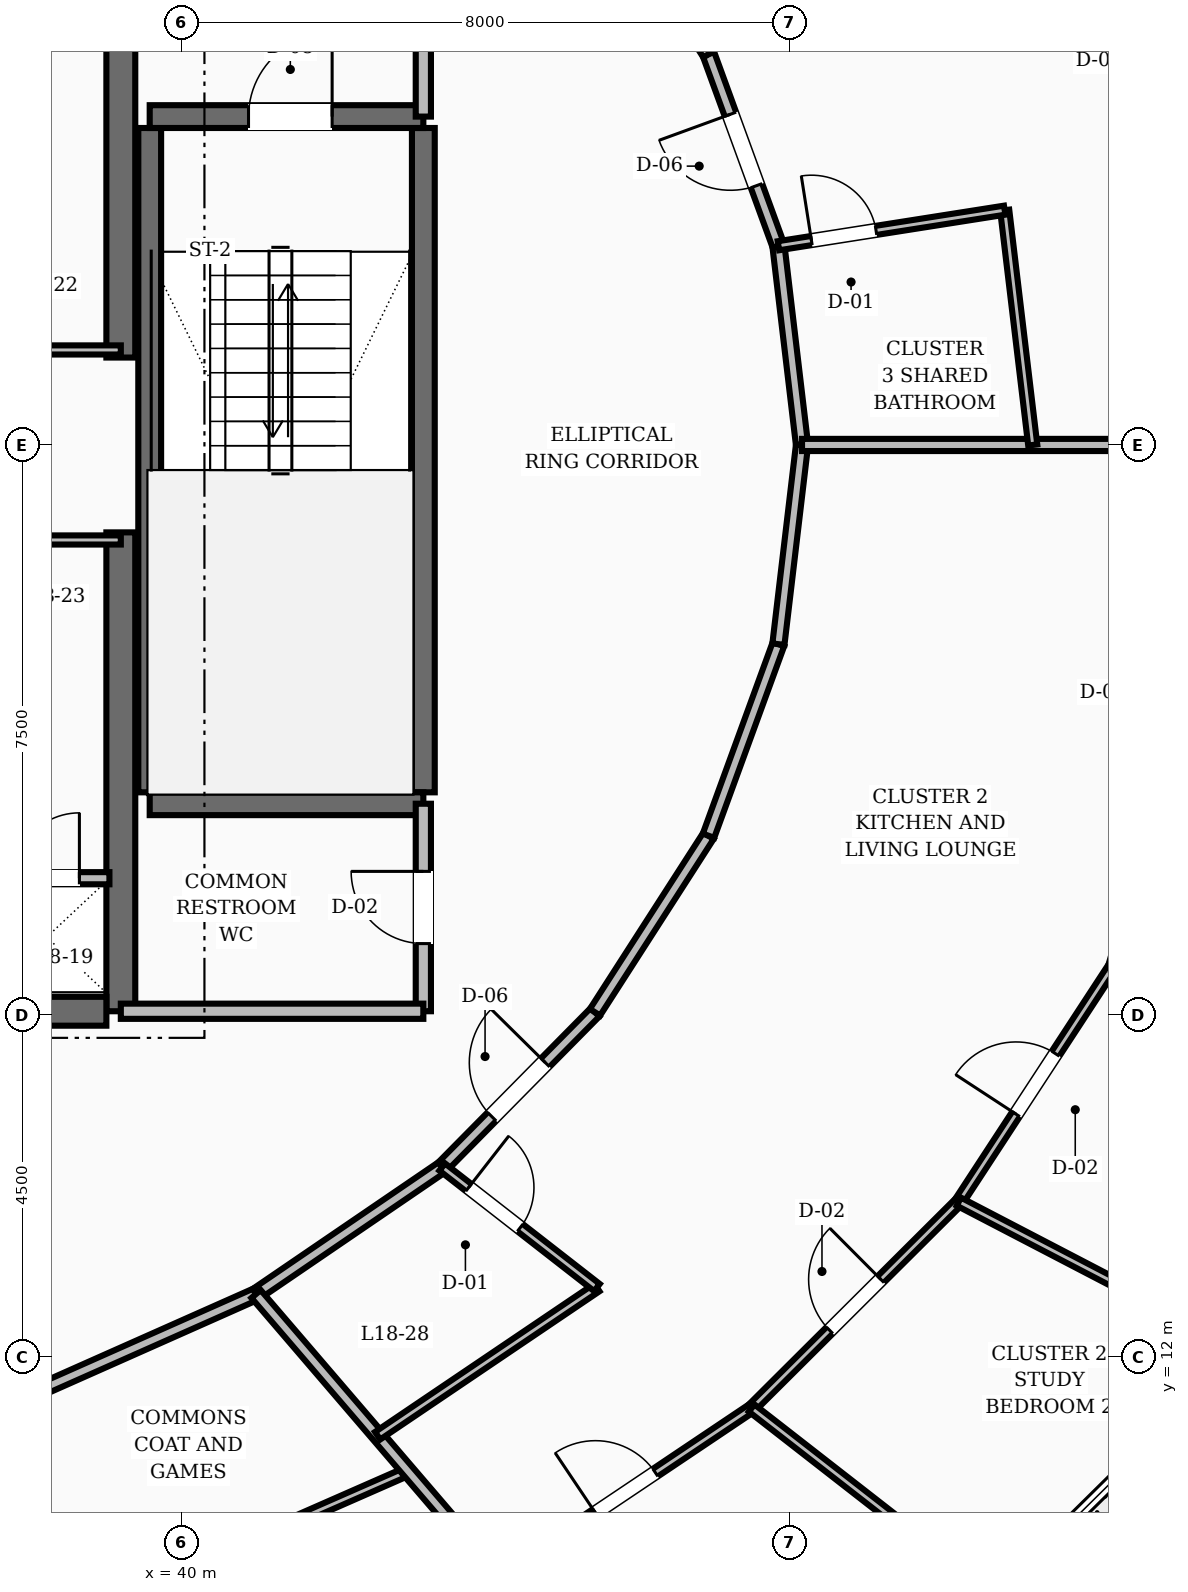
"""IFC4 building model, lengths in metres.
Left out: names, types, materials, properties, quantities, classifications, styles, units other than length and angle.
Written with IfcOpenShell. Run it as: python <this file> out.ifc"""

import sys

from ifc_helpers import new_model, si_unit, direction, frame, frame_2d, origin, place, context, subcontext, project, spatial, rectangle, extrude, element, fill, save


model = new_model("IFC4")
c1 = context("Model", 3, precision=1e-05, world=origin(), true_north=direction((0.0, 1.0)))
c2 = subcontext(c1, "Body", "Model", "MODEL_VIEW")
j1 = project(units=[si_unit("LENGTHUNIT", "METRE"), si_unit("PLANEANGLEUNIT", "RADIAN")], contexts=[c1])
p1 = place(None, origin())
s1 = spatial("IfcSite", under=j1, at=p1, CompositionType="ELEMENT")
p2 = place(p1, origin())
s2 = spatial("IfcBuilding", under=s1, at=p2, CompositionType="ELEMENT")
p3 = place(p2, frame((0.0, 0.0, 73.6)))
s3 = spatial("IfcBuildingStorey", under=s2, at=p3, CompositionType="ELEMENT", Elevation=73.6)
for number, where, z_axis, x_axis in (
    (1, (39.2, 16.55, 0.0), (0.0, 0.0, 1.0), (0.0, 1.0, 0.0)),
    (2, (39.2, 25.15, 0.0), (0.0, 0.0, 1.0), (0.0, 1.0, 0.0)),
):
    element("IfcWall", number, at=place(p3, frame(where, z_axis=z_axis, x_axis=x_axis)), inside=s3, PredefinedType="SHEAR", context=c2, shape_type="SweptSolid", body=[
        extrude(rectangle(XDim=6.3, YDim=0.38, at=frame_2d((3.15, 0.0))), origin(), (0.0, 0.0, 1.0), 3.6),
    ])
p4 = place(p3, frame((35.8, 16.55, 0.0), z_axis=(0.0, 0.0, 1.0), x_axis=(1.0, 0.0, 0.0)))
e3 = element("IfcWall", 3, at=p4, inside=s3, PredefinedType="SHEAR", context=c2, shape_type="SweptSolid", body=[
    extrude(rectangle(XDim=3.21, YDim=0.38, at=frame_2d((1.605, 0.0))), origin(), (0.0, 0.0, 1.0), 3.6),
])
p5 = place(p4, frame((0.3, 0.0, 0.0)))
e4 = element("IfcOpeningElement", 4, at=p5, cuts=e3, PredefinedType="OPENING", context=c2, shape_type="SweptSolid", body=[
    extrude(rectangle(XDim=1.1, YDim=2.1, at=frame_2d((0.55, 1.05))), frame((0.0, 0.2, 0.0), z_axis=(0.0, -1.0, 0.0), x_axis=(1.0, 0.0, 0.0)), (0.0, 0.0, 1.0), 0.4),
])
for number, where, z_axis, x_axis in (
    (5, (43.18, 19.43, 0.0), (0.0, 0.0, 1.0), (0.0, 1.0, 0.0)),
    (6, (39.58, 19.43, 0.0), (0.0, 0.0, 1.0), (0.0, 1.0, 0.0)),
):
    element("IfcWall", number, at=place(p3, frame(where, z_axis=z_axis, x_axis=x_axis)), inside=s3, PredefinedType="SHEAR", context=c2, shape_type="SweptSolid", body=[
        extrude(rectangle(XDim=8.74, YDim=0.3, at=frame_2d((4.37, 0.0))), origin(), (0.0, 0.0, 1.0), 3.6),
    ])
p6 = place(p3, frame((39.58, 19.28, 0.0), z_axis=(0.0, 0.0, 1.0), x_axis=(1.0, 0.0, 0.0)))
e7 = element("IfcWall", 7, at=p6, inside=s3, PredefinedType="SHEAR", context=c2, shape_type="SweptSolid", body=[
    extrude(rectangle(XDim=3.6, YDim=0.3, at=frame_2d((1.8, 0.0))), origin(), (0.0, 0.0, 1.0), 3.6),
])
p7 = place(p3, frame((39.58, 28.32, 0.0), z_axis=(0.0, 0.0, 1.0), x_axis=(1.0, 0.0, 0.0)))
e8 = element("IfcWall", 8, at=p7, inside=s3, PredefinedType="SHEAR", context=c2, shape_type="SweptSolid", body=[
    extrude(rectangle(XDim=3.6, YDim=0.3, at=frame_2d((1.8, 0.0))), origin(), (0.0, 0.0, 1.0), 3.6),
])
p8 = place(p7, frame((1.3, 0.0, 0.0)))
e9 = element("IfcOpeningElement", 9, at=p8, cuts=e8, PredefinedType="OPENING", context=c2, shape_type="SweptSolid", body=[
    extrude(rectangle(XDim=1.1, YDim=2.1, at=frame_2d((0.55, 1.05))), frame((0.0, 0.16, 0.0), z_axis=(0.0, -1.0, 0.0), x_axis=(1.0, 0.0, 0.0)), (0.0, 0.0, 1.0), 0.32),
])
p9 = place(p3, frame((43.18, 28.32, 0.0), z_axis=(0.0, 0.0, 1.0), x_axis=(0.0, 1.0, 0.0)))
e10 = element("IfcWall", 10, at=p9, inside=s3, PredefinedType="SOLIDWALL", context=c2, shape_type="SweptSolid", body=[
    extrude(rectangle(XDim=3.13, YDim=0.2, at=frame_2d((1.565, 0.0))), origin(), (0.0, 0.0, 1.0), 2.71),
])
p10 = place(p9, frame((1.015, 0.0, 0.0)))
e11 = element("IfcOpeningElement", 11, at=p10, cuts=e10, PredefinedType="OPENING", context=c2, shape_type="SweptSolid", body=[
    extrude(rectangle(XDim=1.1, YDim=2.1, at=frame_2d((0.55, 1.05))), frame((0.0, 0.11, 0.0), z_axis=(0.0, -1.0, 0.0), x_axis=(1.0, 0.0, 0.0)), (0.0, 0.0, 1.0), 0.22),
])
p11 = place(p3, frame((43.18, 16.55, 0.0), z_axis=(0.0, 0.0, 1.0), x_axis=(0.0, 1.0, 0.0)))
e12 = element("IfcWall", 12, at=p11, inside=s3, PredefinedType="SOLIDWALL", context=c2, shape_type="SweptSolid", body=[
    extrude(rectangle(XDim=2.73, YDim=0.2, at=frame_2d((1.365, 0.0))), origin(), (0.0, 0.0, 1.0), 2.71),
])
p12 = place(p11, frame((0.89, 0.0, 0.0)))
e13 = element("IfcOpeningElement", 13, at=p12, cuts=e12, PredefinedType="OPENING", context=c2, shape_type="SweptSolid", body=[
    extrude(rectangle(XDim=0.95, YDim=2.1, at=frame_2d((0.475, 1.05))), frame((0.0, 0.11, 0.0), z_axis=(0.0, -1.0, 0.0), x_axis=(1.0, 0.0, 0.0)), (0.0, 0.0, 1.0), 0.22),
])
p13 = place(p3, frame((39.2, 16.55, 0.0), z_axis=(0.0, 0.0, 1.0), x_axis=(1.0, 0.0, 0.0)))
e14 = element("IfcWall", 14, at=p13, inside=s3, PredefinedType="SOLIDWALL", context=c2, shape_type="SweptSolid", body=[
    extrude(rectangle(XDim=3.98, YDim=0.2, at=frame_2d((1.99, 0.0))), origin(), (0.0, 0.0, 1.0), 2.71),
])
p14 = place(p3, frame((37.4, 18.3, 0.0), z_axis=(0.0, 0.0, 1.0), x_axis=(1.0, 0.0, 0.0)))
e15 = element("IfcWall", 15, at=p14, inside=s3, PredefinedType="SOLIDWALL", context=c2, shape_type="SweptSolid", body=[
    extrude(rectangle(XDim=1.65, YDim=0.16, at=frame_2d((0.825, 0.0))), origin(), (0.0, 0.0, 1.0), 2.71),
])
p15 = place(p14, frame((0.395, 0.0, 0.0)))
e16 = element("IfcOpeningElement", 16, at=p15, cuts=e15, PredefinedType="OPENING", context=c2, shape_type="SweptSolid", body=[
    extrude(rectangle(XDim=0.86, YDim=2.1, at=frame_2d((0.43, 1.05))), frame((0.0, 0.09, 0.0), z_axis=(0.0, -1.0, 0.0), x_axis=(1.0, 0.0, 0.0)), (0.0, 0.0, 1.0), 0.18),
])
for number, where, z_axis, x_axis in (
    (17, (37.4, 25.25, 0.0), (0.0, 0.0, 1.0), (1.0, 0.0, 0.0)),
    (18, (37.4, 22.75, 0.0), (0.0, 0.0, 1.0), (1.0, 0.0, 0.0)),
):
    element("IfcWall", number, at=place(p3, frame(where, z_axis=z_axis, x_axis=x_axis)), inside=s3, PredefinedType="PARTITIONING", context=c2, shape_type="SweptSolid", body=[
        extrude(rectangle(XDim=1.8, YDim=0.12, at=frame_2d((0.9, 0.0))), origin(), (0.0, 0.0, 1.0), 2.71),
    ])
p16 = place(p3, frame((48.162, 24.0, 0.0), z_axis=(0.0, 0.0, 1.0), x_axis=(-0.117667763342, 0.993053018459, 0.0)))
e19 = element("IfcWall", 19, at=p16, inside=s3, PredefinedType="SOLIDWALL", context=c2, shape_type="SweptSolid", body=[
    extrude(rectangle(XDim=2.639, YDim=0.16, at=frame_2d((1.32, 0.0))), origin(), (0.0, 0.0, 1.0), 2.71),
])
p17 = place(p3, frame((47.852, 26.621, 0.0), z_axis=(0.0, 0.0, 1.0), x_axis=(-0.342882618672, 0.939378257047, 0.0)))
e20 = element("IfcWall", 20, at=p17, inside=s3, PredefinedType="SOLIDWALL", context=c2, shape_type="SweptSolid", body=[
    extrude(rectangle(XDim=2.683, YDim=0.16, at=frame_2d((1.341, 0.0))), origin(), (0.0, 0.0, 1.0), 2.71),
])
p18 = place(p17, frame((0.841, 0.0, 0.0)))
e21 = element("IfcOpeningElement", 21, at=p18, cuts=e20, PredefinedType="OPENING", context=c2, shape_type="SweptSolid", body=[
    extrude(rectangle(XDim=1.0, YDim=2.1, at=frame_2d((0.5, 1.05))), frame((0.0, 0.09, 0.0), z_axis=(0.0, -1.0, 0.0), x_axis=(1.0, 0.0, 0.0)), (0.0, 0.0, 1.0), 0.18),
])
p19 = place(p3, frame((46.932, 29.141, 0.0), z_axis=(0.0, 0.0, 1.0), x_axis=(-0.540891657444, 0.841092274907, 0.0)))
e22 = element("IfcWall", 22, at=p19, inside=s3, PredefinedType="SOLIDWALL", context=c2, shape_type="SweptSolid", body=[
    extrude(rectangle(XDim=2.761, YDim=0.16, at=frame_2d((1.38, 0.0))), origin(), (0.0, 0.0, 1.0), 2.71),
])
p20 = place(p3, frame((38.185, 11.589, 0.0), z_axis=(0.0, 0.0, 1.0), x_axis=(0.913860932409, 0.406027334321, 0.0)))
e23 = element("IfcWall", 23, at=p20, inside=s3, PredefinedType="SOLIDWALL", context=c2, shape_type="SweptSolid", body=[
    extrude(rectangle(XDim=3.058, YDim=0.16, at=frame_2d((1.529, 0.0))), origin(), (0.0, 0.0, 1.0), 2.71),
])
p21 = place(p3, frame((40.979, 12.83, 0.0), z_axis=(0.0, 0.0, 1.0), x_axis=(0.826112340767, 0.563505457323, 0.0)))
e24 = element("IfcWall", 24, at=p21, inside=s3, PredefinedType="SOLIDWALL", context=c2, shape_type="SweptSolid", body=[
    extrude(rectangle(XDim=2.965, YDim=0.16, at=frame_2d((1.482, 0.0))), origin(), (0.0, 0.0, 1.0), 2.71),
])
p22 = place(p3, frame((43.428, 14.501, 0.0), z_axis=(0.0, 0.0, 1.0), x_axis=(0.702569520063, 0.711615113301, 0.0)))
e25 = element("IfcWall", 25, at=p22, inside=s3, PredefinedType="SOLIDWALL", context=c2, shape_type="SweptSolid", body=[
    extrude(rectangle(XDim=2.861, YDim=0.16, at=frame_2d((1.43, 0.0))), origin(), (0.0, 0.0, 1.0), 2.71),
])
p23 = place(p22, frame((0.93, 0.0, 0.0)))
e26 = element("IfcOpeningElement", 26, at=p23, cuts=e25, PredefinedType="OPENING", context=c2, shape_type="SweptSolid", body=[
    extrude(rectangle(XDim=1.0, YDim=2.1, at=frame_2d((0.5, 1.05))), frame((0.0, 0.09, 0.0), z_axis=(0.0, -1.0, 0.0), x_axis=(1.0, 0.0, 0.0)), (0.0, 0.0, 1.0), 0.18),
])
p24 = place(p3, frame((45.438, 16.537, 0.0), z_axis=(0.0, 0.0, 1.0), x_axis=(0.540891657444, 0.841092274907, 0.0)))
e27 = element("IfcWall", 27, at=p24, inside=s3, PredefinedType="SOLIDWALL", context=c2, shape_type="SweptSolid", body=[
    extrude(rectangle(XDim=2.761, YDim=0.16, at=frame_2d((1.38, 0.0))), origin(), (0.0, 0.0, 1.0), 2.71),
])
p25 = place(p3, frame((46.932, 18.859, 0.0), z_axis=(0.0, 0.0, 1.0), x_axis=(0.342882618672, 0.939378257047, 0.0)))
e28 = element("IfcWall", 28, at=p25, inside=s3, PredefinedType="SOLIDWALL", context=c2, shape_type="SweptSolid", body=[
    extrude(rectangle(XDim=2.683, YDim=0.16, at=frame_2d((1.341, 0.0))), origin(), (0.0, 0.0, 1.0), 2.71),
])
p26 = place(p3, frame((47.852, 21.379, 0.0), z_axis=(0.0, 0.0, 1.0), x_axis=(0.117667763342, 0.993053018459, 0.0)))
e29 = element("IfcWall", 29, at=p26, inside=s3, PredefinedType="SOLIDWALL", context=c2, shape_type="SweptSolid", body=[
    extrude(rectangle(XDim=2.639, YDim=0.16, at=frame_2d((1.32, 0.0))), origin(), (0.0, 0.0, 1.0), 2.71),
])
p27 = place(p3, frame((39.562, 8.999, 0.0), z_axis=(0.0, 0.0, 1.0), x_axis=(0.915567645544, 0.402164004397, 0.0)))
e30 = element("IfcWall", 30, at=p27, inside=s3, PredefinedType="PARTITIONING", context=c2, shape_type="SweptSolid", body=[
    extrude(rectangle(XDim=3.731, YDim=0.12, at=frame_2d((1.865, 0.0))), origin(), (0.0, 0.0, 1.0), 2.71),
])
p28 = place(p3, frame((40.979, 12.83, 0.0), z_axis=(0.0, 0.0, 1.0), x_axis=(0.651051797371, -0.759033304368, 0.0)))
e31 = element("IfcWall", 31, at=p28, inside=s3, PredefinedType="SOLIDWALL", context=c2, shape_type="SweptSolid", body=[
    extrude(rectangle(XDim=8.723, YDim=0.16, at=frame_2d((4.361, 0.0))), origin(), (0.0, 0.0, 1.0), 2.71),
])
p29 = place(p3, frame((42.578, 10.966, 0.0), z_axis=(0.0, 0.0, 1.0), x_axis=(0.828593363903, 0.55985090631, 0.0)))
e32 = element("IfcWall", 32, at=p29, inside=s3, PredefinedType="PARTITIONING", context=c2, shape_type="SweptSolid", body=[
    extrude(rectangle(XDim=3.482, YDim=0.12, at=frame_2d((1.741, 0.0))), origin(), (0.0, 0.0, 1.0), 2.71),
])
p30 = place(p3, frame((43.428, 14.501, 0.0), z_axis=(0.0, 0.0, 1.0), x_axis=(0.788862844391, -0.61456929043, 0.0)))
e33 = element("IfcWall", 33, at=p30, inside=s3, PredefinedType="PARTITIONING", context=c2, shape_type="SweptSolid", body=[
    extrude(rectangle(XDim=2.58, YDim=0.12, at=frame_2d((1.29, 0.0))), origin(), (0.0, 0.0, 1.0), 2.71),
])
p31 = place(p30, frame((0.44, 0.0, 0.0)))
e34 = element("IfcOpeningElement", 34, at=p31, cuts=e33, PredefinedType="OPENING", context=c2, shape_type="SweptSolid", body=[
    extrude(rectangle(XDim=0.86, YDim=2.1, at=frame_2d((0.43, 1.05))), frame((0.0, 0.07, 0.0), z_axis=(0.0, -1.0, 0.0), x_axis=(1.0, 0.0, 0.0)), (0.0, 0.0, 1.0), 0.14),
])
p32 = place(p3, frame((44.177, 9.101, 0.0), z_axis=(0.0, 0.0, 1.0), x_axis=(0.830412762524, 0.557148673011, 0.0)))
e35 = element("IfcWall", 35, at=p32, inside=s3, PredefinedType="PARTITIONING", context=c2, shape_type="SweptSolid", body=[
    extrude(rectangle(XDim=4.0, YDim=0.12, at=frame_2d((2.0, 0.0))), origin(), (0.0, 0.0, 1.0), 2.71),
])
p33 = place(p32, frame((1.525, 0.0, 0.0)))
e36 = element("IfcOpeningElement", 36, at=p33, cuts=e35, PredefinedType="OPENING", context=c2, shape_type="SweptSolid", body=[
    extrude(rectangle(XDim=0.95, YDim=2.1, at=frame_2d((0.475, 1.05))), frame((0.0, 0.07, 0.0), z_axis=(0.0, -1.0, 0.0), x_axis=(1.0, 0.0, 0.0)), (0.0, 0.0, 1.0), 0.14),
])
p34 = place(p3, frame((47.499, 11.33, 0.0), z_axis=(0.0, 0.0, 1.0), x_axis=(0.708501340015, 0.705709466563, 0.0)))
e37 = element("IfcWall", 37, at=p34, inside=s3, PredefinedType="PARTITIONING", context=c2, shape_type="SweptSolid", body=[
    extrude(rectangle(XDim=3.848, YDim=0.12, at=frame_2d((1.924, 0.0))), origin(), (0.0, 0.0, 1.0), 2.71),
])
p35 = place(p34, frame((1.449, 0.0, 0.0)))
e38 = element("IfcOpeningElement", 38, at=p35, cuts=e37, PredefinedType="OPENING", context=c2, shape_type="SweptSolid", body=[
    extrude(rectangle(XDim=0.95, YDim=2.1, at=frame_2d((0.475, 1.05))), frame((0.0, 0.07, 0.0), z_axis=(0.0, -1.0, 0.0), x_axis=(1.0, 0.0, 0.0)), (0.0, 0.0, 1.0), 0.14),
])
p36 = place(p3, frame((47.499, 11.33, 0.0), z_axis=(0.0, 0.0, 1.0), x_axis=(0.788892410808, -0.614531337012, 0.0)))
e39 = element("IfcWall", 39, at=p36, inside=s3, PredefinedType="PARTITIONING", context=c2, shape_type="SweptSolid", body=[
    extrude(rectangle(XDim=4.005, YDim=0.12, at=frame_2d((2.002, 0.0))), origin(), (0.0, 0.0, 1.0), 2.71),
])
p37 = place(p3, frame((50.225, 14.045, 0.0), z_axis=(0.0, 0.0, 1.0), x_axis=(0.547219150068, 0.836989367793, 0.0)))
e40 = element("IfcWall", 40, at=p37, inside=s3, PredefinedType="PARTITIONING", context=c2, shape_type="SweptSolid", body=[
    extrude(rectangle(XDim=3.701, YDim=0.12, at=frame_2d((1.851, 0.0))), origin(), (0.0, 0.0, 1.0), 2.71),
])
p38 = place(p37, frame((1.375, 0.0, 0.0)))
e41 = element("IfcOpeningElement", 41, at=p38, cuts=e40, PredefinedType="OPENING", context=c2, shape_type="SweptSolid", body=[
    extrude(rectangle(XDim=0.95, YDim=2.1, at=frame_2d((0.475, 1.05))), frame((0.0, 0.07, 0.0), z_axis=(0.0, -1.0, 0.0), x_axis=(1.0, 0.0, 0.0)), (0.0, 0.0, 1.0), 0.14),
])
p39 = place(p3, frame((50.225, 14.045, 0.0), z_axis=(0.0, 0.0, 1.0), x_axis=(0.88702496615, -0.461721463034, 0.0)))
e42 = element("IfcWall", 42, at=p39, inside=s3, PredefinedType="PARTITIONING", context=c2, shape_type="SweptSolid", body=[
    extrude(rectangle(XDim=4.19, YDim=0.12, at=frame_2d((2.095, 0.0))), origin(), (0.0, 0.0, 1.0), 2.71),
])
p40 = place(p3, frame((52.25, 17.143, 0.0), z_axis=(0.0, 0.0, 1.0), x_axis=(0.277696791091, 0.960668773417, 0.0)))
e43 = element("IfcWall", 43, at=p40, inside=s3, PredefinedType="PARTITIONING", context=c2, shape_type="SweptSolid", body=[
    extrude(rectangle(XDim=7.138, YDim=0.12, at=frame_2d((3.569, 0.0))), origin(), (0.0, 0.0, 1.0), 2.71),
])
p41 = place(p40, frame((3.094, 0.0, 0.0)))
e44 = element("IfcOpeningElement", 44, at=p41, cuts=e43, PredefinedType="OPENING", context=c2, shape_type="SweptSolid", body=[
    extrude(rectangle(XDim=0.95, YDim=2.1, at=frame_2d((0.475, 1.05))), frame((0.0, 0.07, 0.0), z_axis=(0.0, -1.0, 0.0), x_axis=(1.0, 0.0, 0.0)), (0.0, 0.0, 1.0), 0.14),
])
p42 = place(p3, frame((48.162, 24.0, 0.0), z_axis=(0.0, 0.0, 1.0), x_axis=(1.0, 0.0, 0.0)))
e45 = element("IfcWall", 45, at=p42, inside=s3, PredefinedType="SOLIDWALL", context=c2, shape_type="SweptSolid", body=[
    extrude(rectangle(XDim=10.79, YDim=0.16, at=frame_2d((5.395, 0.0))), origin(), (0.0, 0.0, 1.0), 2.71),
])
p43 = place(p3, frame((51.197, 24.0, 0.0), z_axis=(0.0, 0.0, 1.0), x_axis=(-0.118507685269, 0.992953135114, 0.0)))
e46 = element("IfcWall", 46, at=p43, inside=s3, PredefinedType="PARTITIONING", context=c2, shape_type="SweptSolid", body=[
    extrude(rectangle(XDim=3.111, YDim=0.12, at=frame_2d((1.555, 0.0))), origin(), (0.0, 0.0, 1.0), 2.71),
])
p44 = place(p3, frame((47.852, 26.621, 0.0), z_axis=(0.0, 0.0, 1.0), x_axis=(0.987867184376, 0.15530108188, 0.0)))
e47 = element("IfcWall", 47, at=p44, inside=s3, PredefinedType="PARTITIONING", context=c2, shape_type="SweptSolid", body=[
    extrude(rectangle(XDim=3.014, YDim=0.12, at=frame_2d((1.507, 0.0))), origin(), (0.0, 0.0, 1.0), 2.71),
])
p45 = place(p44, frame((0.44, 0.0, 0.0)))
e48 = element("IfcOpeningElement", 48, at=p45, cuts=e47, PredefinedType="OPENING", context=c2, shape_type="SweptSolid", body=[
    extrude(rectangle(XDim=0.86, YDim=2.1, at=frame_2d((0.43, 1.05))), frame((0.0, 0.07, 0.0), z_axis=(0.0, -1.0, 0.0), x_axis=(1.0, 0.0, 0.0)), (0.0, 0.0, 1.0), 0.14),
])
p46 = place(p8, origin())
e49 = element("IfcDoor", 49, at=p46, inside=s3, OperationType="SINGLE_SWING_RIGHT", PredefinedType="DOOR", context=c2, shape_type="SweptSolid", body=[
    extrude(rectangle(XDim=1.1, YDim=2.1, at=frame_2d((0.55, 1.05))), frame((0.0, 0.025, 0.0), z_axis=(0.0, -1.0, 0.0), x_axis=(1.0, 0.0, 0.0)), (0.0, 0.0, 1.0), 0.05),
])
fill(e9, e49)
p47 = place(p12, origin())
e50 = element("IfcDoor", 50, at=p47, inside=s3, OperationType="SINGLE_SWING_RIGHT", PredefinedType="DOOR", context=c2, shape_type="SweptSolid", body=[
    extrude(rectangle(XDim=0.95, YDim=2.1, at=frame_2d((0.475, 1.05))), frame((0.0, 0.025, 0.0), z_axis=(0.0, -1.0, 0.0), x_axis=(1.0, 0.0, 0.0)), (0.0, 0.0, 1.0), 0.05),
])
fill(e13, e50)
p48 = place(p15, origin())
e51 = element("IfcDoor", 51, at=p48, inside=s3, OperationType="SINGLE_SWING_RIGHT", PredefinedType="TRAPDOOR", context=c2, shape_type="SweptSolid", body=[
    extrude(rectangle(XDim=0.86, YDim=2.1, at=frame_2d((0.43, 1.05))), frame((0.0, 0.025, 0.0), z_axis=(0.0, -1.0, 0.0), x_axis=(1.0, 0.0, 0.0)), (0.0, 0.0, 1.0), 0.05),
])
fill(e16, e51)
p49 = place(p31, origin())
e52 = element("IfcDoor", 52, at=p49, inside=s3, OperationType="SINGLE_SWING_LEFT", PredefinedType="DOOR", context=c2, shape_type="SweptSolid", body=[
    extrude(rectangle(XDim=0.86, YDim=2.1, at=frame_2d((0.43, 1.05))), frame((0.0, 0.025, 0.0), z_axis=(0.0, -1.0, 0.0), x_axis=(1.0, 0.0, 0.0)), (0.0, 0.0, 1.0), 0.05),
])
fill(e34, e52)
p50 = place(p23, origin())
e53 = element("IfcDoor", 53, at=p50, inside=s3, OperationType="SINGLE_SWING_RIGHT", PredefinedType="DOOR", context=c2, shape_type="SweptSolid", body=[
    extrude(rectangle(XDim=1.0, YDim=2.1, at=frame_2d((0.5, 1.05))), frame((0.0, 0.025, 0.0), z_axis=(0.0, -1.0, 0.0), x_axis=(1.0, 0.0, 0.0)), (0.0, 0.0, 1.0), 0.05),
])
fill(e26, e53)
p51 = place(p33, origin())
e54 = element("IfcDoor", 54, at=p51, inside=s3, OperationType="SINGLE_SWING_LEFT", PredefinedType="DOOR", context=c2, shape_type="SweptSolid", body=[
    extrude(rectangle(XDim=0.95, YDim=2.1, at=frame_2d((0.475, 1.05))), frame((0.0, 0.025, 0.0), z_axis=(0.0, -1.0, 0.0), x_axis=(1.0, 0.0, 0.0)), (0.0, 0.0, 1.0), 0.05),
])
fill(e36, e54)
p52 = place(p35, origin())
e55 = element("IfcDoor", 55, at=p52, inside=s3, OperationType="SINGLE_SWING_RIGHT", PredefinedType="DOOR", context=c2, shape_type="SweptSolid", body=[
    extrude(rectangle(XDim=0.95, YDim=2.1, at=frame_2d((0.475, 1.05))), frame((0.0, 0.025, 0.0), z_axis=(0.0, -1.0, 0.0), x_axis=(1.0, 0.0, 0.0)), (0.0, 0.0, 1.0), 0.05),
])
fill(e38, e55)
p53 = place(p38, origin())
e56 = element("IfcDoor", 56, at=p53, inside=s3, OperationType="SINGLE_SWING_LEFT", PredefinedType="DOOR", context=c2, shape_type="SweptSolid", body=[
    extrude(rectangle(XDim=0.95, YDim=2.1, at=frame_2d((0.475, 1.05))), frame((0.0, 0.025, 0.0), z_axis=(0.0, -1.0, 0.0), x_axis=(1.0, 0.0, 0.0)), (0.0, 0.0, 1.0), 0.05),
])
fill(e41, e56)
p54 = place(p45, origin())
e57 = element("IfcDoor", 57, at=p54, inside=s3, OperationType="SINGLE_SWING_LEFT", PredefinedType="DOOR", context=c2, shape_type="SweptSolid", body=[
    extrude(rectangle(XDim=0.86, YDim=2.1, at=frame_2d((0.43, 1.05))), frame((0.0, 0.025, 0.0), z_axis=(0.0, -1.0, 0.0), x_axis=(1.0, 0.0, 0.0)), (0.0, 0.0, 1.0), 0.05),
])
fill(e48, e57)
p55 = place(p18, origin())
e58 = element("IfcDoor", 58, at=p55, inside=s3, OperationType="SINGLE_SWING_RIGHT", PredefinedType="DOOR", context=c2, shape_type="SweptSolid", body=[
    extrude(rectangle(XDim=1.0, YDim=2.1, at=frame_2d((0.5, 1.05))), frame((0.0, 0.025, 0.0), z_axis=(0.0, -1.0, 0.0), x_axis=(1.0, 0.0, 0.0)), (0.0, 0.0, 1.0), 0.05),
])
fill(e21, e58)
save(model, sys.argv[1])
